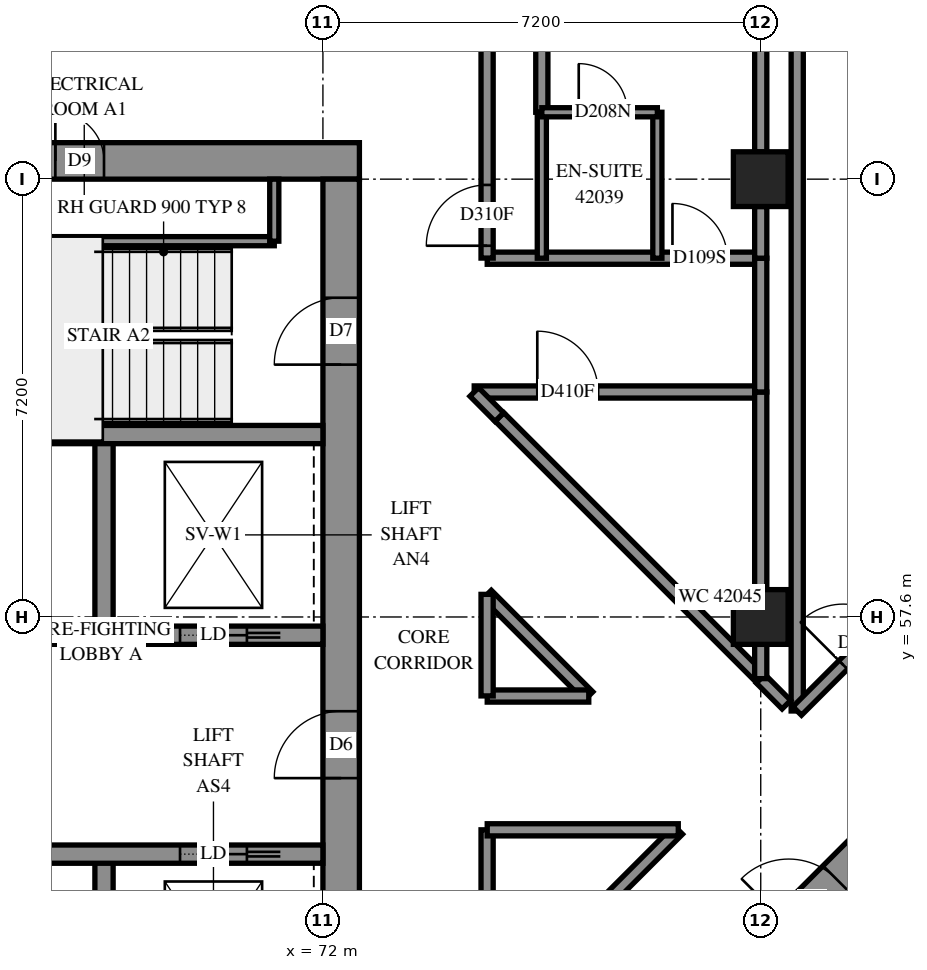
"""IFC4 building model, lengths in metres.
Left out: names, types, materials, properties, quantities, classifications, styles, units other than length and angle.
Written with IfcOpenShell. Run it as: python <this file> out.ifc"""

import sys

from ifc_helpers import new_model, si_unit, direction, frame, frame_2d, origin, origin_2d, place, context, subcontext, project, spatial, rectangle, extrude, element, fill, save


model = new_model("IFC4")
c1 = context("Model", 3, precision=1e-05, world=origin(), true_north=direction((0.0, 1.0)))
c2 = subcontext(c1, "Body", "Model", "MODEL_VIEW")
j1 = project(units=[si_unit("LENGTHUNIT", "METRE"), si_unit("PLANEANGLEUNIT", "RADIAN")], contexts=[c1])
p1 = place(None, origin())
s1 = spatial("IfcSite", under=j1, at=p1, CompositionType="ELEMENT")
p2 = place(p1, origin())
s2 = spatial("IfcBuilding", under=s1, at=p2, CompositionType="ELEMENT")
p3 = place(p2, frame((0.0, 0.0, 155.8)))
s3 = spatial("IfcBuildingStorey", under=s2, at=p3, CompositionType="ELEMENT", Elevation=155.8)
for number, where, z_axis, x_axis in (
    (1, (79.2, 57.6, 0.0), (0.0, 0.0, 1.0), (1.0, 0.0, 0.0)),
    (2, (79.2, 64.8, 0.0), (0.0, 0.0, 1.0), (1.0, 0.0, 0.0)),
):
    element("IfcColumn", number, at=place(p3, frame(where, z_axis=z_axis, x_axis=x_axis)), inside=s3, PredefinedType="COLUMN", context=c2, shape_type="SweptSolid", body=[
        extrude(rectangle(XDim=0.9, YDim=0.9, at=origin_2d()), origin(), (0.0, 0.0, 1.0), 3.1),
    ])
p4 = place(p3, frame((57.0, 65.1, -0.3), z_axis=(0.0, 0.0, 1.0), x_axis=(1.0, 0.0, 0.0)))
e3 = element("IfcWall", 3, at=p4, inside=s3, PredefinedType="SHEAR", context=c2, shape_type="SweptSolid", body=[
    extrude(rectangle(XDim=15.6, YDim=0.6, at=frame_2d((7.8, 0.0))), origin(), (0.0, 0.0, 1.0), 2.7),
])
p5 = place(p4, frame((10.6, 0.0, 0.3)))
e4 = element("IfcOpeningElement", 4, at=p5, cuts=e3, PredefinedType="OPENING", context=c2, shape_type="SweptSolid", body=[
    extrude(rectangle(XDim=0.8, YDim=2.1, at=frame_2d((0.4, 1.05))), frame((0.0, 0.31, 0.0), z_axis=(0.0, -1.0, 0.0), x_axis=(1.0, 0.0, 0.0)), (0.0, 0.0, 1.0), 0.62),
])
p6 = place(p3, frame((72.3, 50.4, -0.3), z_axis=(0.0, 0.0, 1.0), x_axis=(0.0, 1.0, 0.0)))
e5 = element("IfcWall", 5, at=p6, inside=s3, PredefinedType="SHEAR", context=c2, shape_type="SweptSolid", body=[
    extrude(rectangle(XDim=14.4, YDim=0.6, at=frame_2d((7.2, 0.0))), origin(), (0.0, 0.0, 1.0), 2.7),
])
p7 = place(p6, frame((4.55, 0.0, 0.3)))
e6 = element("IfcOpeningElement", 6, at=p7, cuts=e5, PredefinedType="OPENING", context=c2, shape_type="SweptSolid", body=[
    extrude(rectangle(XDim=1.1, YDim=2.1, at=frame_2d((0.55, 1.05))), frame((0.0, 0.31, 0.0), z_axis=(0.0, -1.0, 0.0), x_axis=(1.0, 0.0, 0.0)), (0.0, 0.0, 1.0), 0.62),
])
p8 = place(p6, frame((11.35, 0.0, 0.3)))
e7 = element("IfcOpeningElement", 7, at=p8, cuts=e5, PredefinedType="OPENING", context=c2, shape_type="SweptSolid", body=[
    extrude(rectangle(XDim=1.1, YDim=2.1, at=frame_2d((0.55, 1.05))), frame((0.0, 0.31, 0.0), z_axis=(0.0, -1.0, 0.0), x_axis=(1.0, 0.0, 0.0)), (0.0, 0.0, 1.0), 0.62),
])
for number, where, z_axis, x_axis in (
    (8, (68.4, 50.4, 0.0), (0.0, 0.0, 1.0), (0.0, 1.0, 0.0)),
    (9, (68.4, 57.3, 0.0), (0.0, 0.0, 1.0), (0.0, 1.0, 0.0)),
):
    element("IfcWall", number, at=place(p3, frame(where, z_axis=z_axis, x_axis=x_axis)), inside=s3, PredefinedType="SOLIDWALL", context=c2, shape_type="SweptSolid", body=[
        extrude(rectangle(XDim=3.3, YDim=0.3, at=frame_2d((1.65, 0.0))), origin(), (0.0, 0.0, 1.0), 3.1),
    ])
p9 = place(p3, frame((57.6, 53.7, 0.0), z_axis=(0.0, 0.0, 1.0), x_axis=(1.0, 0.0, 0.0)))
e10 = element("IfcWall", 10, at=p9, inside=s3, PredefinedType="SOLIDWALL", context=c2, shape_type="SweptSolid", body=[
    extrude(rectangle(XDim=14.4, YDim=0.3, at=frame_2d((7.2, 0.0))), origin(), (0.0, 0.0, 1.0), 3.1),
])
p10 = place(p9, frame((1.35, 0.0, 0.0)))
e11 = element("IfcOpeningElement", 11, at=p10, cuts=e10, PredefinedType="OPENING", context=c2, shape_type="SweptSolid", body=[
    extrude(rectangle(XDim=0.9, YDim=2.1, at=frame_2d((0.45, 1.05))), frame((0.0, 0.16, 0.0), z_axis=(0.0, -1.0, 0.0), x_axis=(1.0, 0.0, 0.0)), (0.0, 0.0, 1.0), 0.32),
])
p11 = place(p9, frame((4.95, 0.0, 0.0)))
e12 = element("IfcOpeningElement", 12, at=p11, cuts=e10, PredefinedType="OPENING", context=c2, shape_type="SweptSolid", body=[
    extrude(rectangle(XDim=0.9, YDim=2.1, at=frame_2d((0.45, 1.05))), frame((0.0, 0.16, 0.0), z_axis=(0.0, -1.0, 0.0), x_axis=(1.0, 0.0, 0.0)), (0.0, 0.0, 1.0), 0.32),
])
p12 = place(p9, frame((8.55, 0.0, 0.0)))
e13 = element("IfcOpeningElement", 13, at=p12, cuts=e10, PredefinedType="OPENING", context=c2, shape_type="SweptSolid", body=[
    extrude(rectangle(XDim=0.9, YDim=2.1, at=frame_2d((0.45, 1.05))), frame((0.0, 0.16, 0.0), z_axis=(0.0, -1.0, 0.0), x_axis=(1.0, 0.0, 0.0)), (0.0, 0.0, 1.0), 0.32),
])
p13 = place(p9, frame((12.05, 0.0, 0.0)))
e14 = element("IfcOpeningElement", 14, at=p13, cuts=e10, PredefinedType="OPENING", context=c2, shape_type="SweptSolid", body=[
    extrude(rectangle(XDim=1.1, YDim=2.1, at=frame_2d((0.55, 1.05))), frame((0.0, 0.16, 0.0), z_axis=(0.0, -1.0, 0.0), x_axis=(1.0, 0.0, 0.0)), (0.0, 0.0, 1.0), 0.32),
])
p14 = place(p3, frame((57.6, 57.3, 0.0), z_axis=(0.0, 0.0, 1.0), x_axis=(1.0, 0.0, 0.0)))
e15 = element("IfcWall", 15, at=p14, inside=s3, PredefinedType="SOLIDWALL", context=c2, shape_type="SweptSolid", body=[
    extrude(rectangle(XDim=14.4, YDim=0.3, at=frame_2d((7.2, 0.0))), origin(), (0.0, 0.0, 1.0), 3.1),
])
p15 = place(p14, frame((1.25, 0.0, 0.0)))
e16 = element("IfcOpeningElement", 16, at=p15, cuts=e15, PredefinedType="OPENING", context=c2, shape_type="SweptSolid", body=[
    extrude(rectangle(XDim=1.1, YDim=2.1, at=frame_2d((0.55, 1.05))), frame((0.0, 0.16, 0.0), z_axis=(0.0, -1.0, 0.0), x_axis=(1.0, 0.0, 0.0)), (0.0, 0.0, 1.0), 0.32),
])
p16 = place(p14, frame((4.85, 0.0, 0.0)))
e17 = element("IfcOpeningElement", 17, at=p16, cuts=e15, PredefinedType="OPENING", context=c2, shape_type="SweptSolid", body=[
    extrude(rectangle(XDim=1.1, YDim=2.1, at=frame_2d((0.55, 1.05))), frame((0.0, 0.16, 0.0), z_axis=(0.0, -1.0, 0.0), x_axis=(1.0, 0.0, 0.0)), (0.0, 0.0, 1.0), 0.32),
])
p17 = place(p14, frame((8.45, 0.0, 0.0)))
e18 = element("IfcOpeningElement", 18, at=p17, cuts=e15, PredefinedType="OPENING", context=c2, shape_type="SweptSolid", body=[
    extrude(rectangle(XDim=1.1, YDim=2.1, at=frame_2d((0.55, 1.05))), frame((0.0, 0.16, 0.0), z_axis=(0.0, -1.0, 0.0), x_axis=(1.0, 0.0, 0.0)), (0.0, 0.0, 1.0), 0.32),
])
p18 = place(p14, frame((12.05, 0.0, 0.0)))
e19 = element("IfcOpeningElement", 19, at=p18, cuts=e15, PredefinedType="OPENING", context=c2, shape_type="SweptSolid", body=[
    extrude(rectangle(XDim=1.1, YDim=2.1, at=frame_2d((0.55, 1.05))), frame((0.0, 0.16, 0.0), z_axis=(0.0, -1.0, 0.0), x_axis=(1.0, 0.0, 0.0)), (0.0, 0.0, 1.0), 0.32),
])
p19 = place(p3, frame((64.8, 60.6, 0.0), z_axis=(0.0, 0.0, 1.0), x_axis=(1.0, 0.0, 0.0)))
e20 = element("IfcWall", 20, at=p19, inside=s3, PredefinedType="SOLIDWALL", context=c2, shape_type="SweptSolid", body=[
    extrude(rectangle(XDim=7.2, YDim=0.3, at=frame_2d((3.6, 0.0))), origin(), (0.0, 0.0, 1.0), 3.1),
])
p20 = place(p3, frame((76.442, 49.302, -0.3), z_axis=(0.0, 0.0, 1.0), x_axis=(0.7071067812, 0.7071067812, 0.0)))
e21 = element("IfcWall", 21, at=p20, inside=s3, PredefinedType="SHEAR", context=c2, shape_type="SweptSolid", body=[
    extrude(rectangle(XDim=14.4, YDim=0.6, at=frame_2d((7.2, 0.0))), origin(), (0.0, 0.0, 1.0), 2.7),
])
p21 = place(p20, frame((4.55, 0.0, 0.3)))
e22 = element("IfcOpeningElement", 22, at=p21, cuts=e21, PredefinedType="OPENING", context=c2, shape_type="SweptSolid", body=[
    extrude(rectangle(XDim=1.1, YDim=2.1, at=frame_2d((0.55, 1.05))), frame((0.0, 0.31, 0.0), z_axis=(0.0, -1.0, 0.0), x_axis=(1.0, 0.0, 0.0)), (0.0, 0.0, 1.0), 0.62),
])
p22 = place(p20, frame((11.35, 0.0, 0.3)))
e23 = element("IfcOpeningElement", 23, at=p22, cuts=e21, PredefinedType="OPENING", context=c2, shape_type="SweptSolid", body=[
    extrude(rectangle(XDim=1.1, YDim=2.1, at=frame_2d((0.55, 1.05))), frame((0.0, 0.31, 0.0), z_axis=(0.0, -1.0, 0.0), x_axis=(1.0, 0.0, 0.0)), (0.0, 0.0, 1.0), 0.62),
])
p23 = place(p3, frame((64.95, 63.78, 0.0), z_axis=(0.0, 0.0, 1.0), x_axis=(1.0, 0.0, 0.0)))
e24 = element("IfcWall", 24, at=p23, inside=s3, PredefinedType="PARTITIONING", context=c2, shape_type="SweptSolid", body=[
    extrude(rectangle(XDim=6.25, YDim=0.15, at=frame_2d((3.125, 0.0))), origin(), (0.0, 0.0, 1.0), 3.1),
])
p24 = place(p3, frame((71.2, 63.78, 0.0), z_axis=(0.0, 0.0, 1.0), x_axis=(0.0, 1.0, 0.0)))
e25 = element("IfcWall", 25, at=p24, inside=s3, PredefinedType="PARTITIONING", context=c2, shape_type="SweptSolid", body=[
    extrude(rectangle(XDim=1.02, YDim=0.15, at=frame_2d((0.51, 0.0))), origin(), (0.0, 0.0, 1.0), 3.1),
])
p25 = place(p3, frame((79.8, 56.054, 0.0), z_axis=(0.0, 0.0, 1.0), x_axis=(0.0, 1.0, 0.0)))
e26 = element("IfcWall", 26, at=p25, inside=s3, PredefinedType="PARTITIONING", context=c2, shape_type="SweptSolid", body=[
    extrude(rectangle(XDim=11.454, YDim=0.2, at=frame_2d((5.727, 0.0))), origin(), (0.0, 0.0, 1.0), 3.1),
])
p26 = place(p3, frame((79.799, 56.055, 0.0), z_axis=(0.0, 0.0, 1.0), x_axis=(0.7071067812, 0.7071067812, 0.0)))
e27 = element("IfcWall", 27, at=p26, inside=s3, PredefinedType="PARTITIONING", context=c2, shape_type="SweptSolid", body=[
    extrude(rectangle(XDim=9.95, YDim=0.2, at=frame_2d((4.975, 0.0))), origin(), (0.0, 0.0, 1.0), 3.1),
])
p27 = place(p26, frame((1.071, 0.0, 0.0)))
e28 = element("IfcOpeningElement", 28, at=p27, cuts=e27, PredefinedType="OPENING", context=c2, shape_type="SweptSolid", body=[
    extrude(rectangle(XDim=1.0, YDim=2.1, at=frame_2d((0.5, 1.05))), frame((0.0, 0.11, 0.0), z_axis=(0.0, -1.0, 0.0), x_axis=(1.0, 0.0, 0.0)), (0.0, 0.0, 1.0), 0.22),
])
p28 = place(p3, frame((75.6, 65.9, 0.0), z_axis=(0.0, 0.0, 1.0), x_axis=(0.0, 1.0, 0.0)))
e29 = element("IfcWall", 29, at=p28, inside=s3, PredefinedType="PARTITIONING", context=c2, shape_type="SweptSolid", body=[
    extrude(rectangle(XDim=6.89, YDim=0.2, at=frame_2d((3.445, 0.0))), origin(), (0.0, 0.0, 1.0), 3.1),
])
p29 = place(p3, frame((79.2, 65.25, 0.0), z_axis=(0.0, 0.0, 1.0), x_axis=(0.0, 1.0, 0.0)))
e30 = element("IfcWall", 30, at=p29, inside=s3, PredefinedType="PARTITIONING", context=c2, shape_type="SweptSolid", body=[
    extrude(rectangle(XDim=6.3, YDim=0.2, at=frame_2d((3.15, 0.0))), origin(), (0.0, 0.0, 1.0), 3.1),
])
p30 = place(p3, frame((74.903, 60.889, 0.0), z_axis=(0.0, 0.0, 1.0), x_axis=(0.7071067812, -0.7071067812, 0.0)))
e31 = element("IfcWall", 31, at=p30, inside=s3, PredefinedType="PARTITIONING", context=c2, shape_type="SweptSolid", body=[
    extrude(rectangle(XDim=6.081, YDim=0.2, at=frame_2d((3.041, 0.0))), origin(), (0.0, 0.0, 1.0), 3.1),
])
p31 = place(p3, frame((74.488, 61.3, 0.0), z_axis=(0.0, 0.0, 1.0), x_axis=(1.0, 0.0, 0.0)))
e32 = element("IfcWall", 32, at=p31, inside=s3, PredefinedType="PARTITIONING", context=c2, shape_type="SweptSolid", body=[
    extrude(rectangle(XDim=4.712, YDim=0.2, at=frame_2d((2.356, 0.0))), origin(), (0.0, 0.0, 1.0), 3.1),
])
p32 = place(p31, frame((1.037, 0.0, 0.0)))
e33 = element("IfcOpeningElement", 33, at=p32, cuts=e32, PredefinedType="OPENING", context=c2, shape_type="SweptSolid", body=[
    extrude(rectangle(XDim=1.0, YDim=2.1, at=frame_2d((0.5, 1.05))), frame((0.0, 0.11, 0.0), z_axis=(0.0, -1.0, 0.0), x_axis=(1.0, 0.0, 0.0)), (0.0, 0.0, 1.0), 0.22),
])
p33 = place(p3, frame((74.702, 63.5, 0.0), z_axis=(0.0, 0.0, 1.0), x_axis=(1.0, 0.0, 0.0)))
e34 = element("IfcWall", 34, at=p33, inside=s3, PredefinedType="PARTITIONING", context=c2, shape_type="SweptSolid", body=[
    extrude(rectangle(XDim=4.498, YDim=0.2, at=frame_2d((2.249, 0.0))), origin(), (0.0, 0.0, 1.0), 3.1),
])
p34 = place(p33, frame((3.046, 0.0, 0.0)))
e35 = element("IfcOpeningElement", 35, at=p34, cuts=e34, PredefinedType="OPENING", context=c2, shape_type="SweptSolid", body=[
    extrude(rectangle(XDim=0.9, YDim=2.1, at=frame_2d((0.45, 1.05))), frame((0.0, 0.11, 0.0), z_axis=(0.0, -1.0, 0.0), x_axis=(1.0, 0.0, 0.0)), (0.0, 0.0, 1.0), 0.22),
])
p35 = place(p3, frame((74.701, 50.957, 0.0), z_axis=(0.0, 0.0, 1.0), x_axis=(0.7071067812, 0.7071067812, 0.0)))
e36 = element("IfcWall", 36, at=p35, inside=s3, PredefinedType="PARTITIONING", context=c2, shape_type="SweptSolid", body=[
    extrude(rectangle(XDim=4.444, YDim=0.2, at=frame_2d((2.222, 0.0))), origin(), (0.0, 0.0, 1.0), 3.1),
])
p36 = place(p3, frame((74.7, 63.502, 0.0), z_axis=(0.0, 0.0, 1.0), x_axis=(0.0, 1.0, 0.0)))
e37 = element("IfcWall", 37, at=p36, inside=s3, PredefinedType="PARTITIONING", context=c2, shape_type="SweptSolid", body=[
    extrude(rectangle(XDim=3.998, YDim=0.2, at=frame_2d((1.999, 0.0))), origin(), (0.0, 0.0, 1.0), 3.1),
])
p37 = place(p36, frame((0.203, 0.0, 0.0)))
e38 = element("IfcOpeningElement", 38, at=p37, cuts=e37, PredefinedType="OPENING", context=c2, shape_type="SweptSolid", body=[
    extrude(rectangle(XDim=1.0, YDim=2.1, at=frame_2d((0.5, 1.05))), frame((0.0, 0.11, 0.0), z_axis=(0.0, -1.0, 0.0), x_axis=(1.0, 0.0, 0.0)), (0.0, 0.0, 1.0), 0.22),
])
p38 = place(p3, frame((79.2, 58.05, 0.0), z_axis=(0.0, 0.0, 1.0), x_axis=(0.0, 1.0, 0.0)))
e39 = element("IfcWall", 39, at=p38, inside=s3, PredefinedType="PARTITIONING", context=c2, shape_type="SweptSolid", body=[
    extrude(rectangle(XDim=3.25, YDim=0.2, at=frame_2d((1.625, 0.0))), origin(), (0.0, 0.0, 1.0), 3.1),
])
p39 = place(p3, frame((74.7, 50.956, 0.0), z_axis=(0.0, 0.0, 1.0), x_axis=(0.0, 1.0, 0.0)))
e40 = element("IfcWall", 40, at=p39, inside=s3, PredefinedType="PARTITIONING", context=c2, shape_type="SweptSolid", body=[
    extrude(rectangle(XDim=3.144, YDim=0.2, at=frame_2d((1.572, 0.0))), origin(), (0.0, 0.0, 1.0), 3.1),
])
p40 = place(p3, frame((74.702, 54.1, 0.0), z_axis=(0.0, 0.0, 1.0), x_axis=(1.0, 0.0, 0.0)))
e41 = element("IfcWall", 41, at=p40, inside=s3, PredefinedType="PARTITIONING", context=c2, shape_type="SweptSolid", body=[
    extrude(rectangle(XDim=3.142, YDim=0.2, at=frame_2d((1.571, 0.0))), origin(), (0.0, 0.0, 1.0), 3.1),
])
for number, where, z_axis, x_axis in (
    (42, (75.6, 63.5, 0.0), (0.0, 0.0, 1.0), (0.0, 1.0, 0.0)),
    (43, (77.5, 63.5, 0.0), (0.0, 0.0, 1.0), (0.0, 1.0, 0.0)),
):
    element("IfcWall", number, at=place(p3, frame(where, z_axis=z_axis, x_axis=x_axis)), inside=s3, PredefinedType="PARTITIONING", context=c2, shape_type="SweptSolid", body=[
        extrude(rectangle(XDim=2.4, YDim=0.15, at=frame_2d((1.2, 0.0))), origin(), (0.0, 0.0, 1.0), 3.1),
    ])
p41 = place(p3, frame((74.699, 57.969, 0.0), z_axis=(0.0, 0.0, 1.0), x_axis=(0.7071067812, -0.7071067812, 0.0)))
e44 = element("IfcWall", 44, at=p41, inside=s3, PredefinedType="PARTITIONING", context=c2, shape_type="SweptSolid", body=[
    extrude(rectangle(XDim=2.362, YDim=0.2, at=frame_2d((1.181, 0.0))), origin(), (0.0, 0.0, 1.0), 3.1),
])
p42 = place(p3, frame((79.2, 61.3, 0.0), z_axis=(0.0, 0.0, 1.0), x_axis=(0.0, 1.0, 0.0)))
e45 = element("IfcWall", 45, at=p42, inside=s3, PredefinedType="PARTITIONING", context=c2, shape_type="SweptSolid", body=[
    extrude(rectangle(XDim=2.2, YDim=0.2, at=frame_2d((1.1, 0.0))), origin(), (0.0, 0.0, 1.0), 3.1),
])
p43 = place(p3, frame((75.6, 65.9, 0.0), z_axis=(0.0, 0.0, 1.0), x_axis=(1.0, 0.0, 0.0)))
e46 = element("IfcWall", 46, at=p43, inside=s3, PredefinedType="PARTITIONING", context=c2, shape_type="SweptSolid", body=[
    extrude(rectangle(XDim=1.9, YDim=0.15, at=frame_2d((0.95, 0.0))), origin(), (0.0, 0.0, 1.0), 3.1),
])
p44 = place(p43, frame((0.607, 0.0, 0.0)))
e47 = element("IfcOpeningElement", 47, at=p44, cuts=e46, PredefinedType="OPENING", context=c2, shape_type="SweptSolid", body=[
    extrude(rectangle(XDim=0.8, YDim=2.1, at=frame_2d((0.4, 1.05))), frame((0.0, 0.085, 0.0), z_axis=(0.0, -1.0, 0.0), x_axis=(1.0, 0.0, 0.0)), (0.0, 0.0, 1.0), 0.17),
])
for number, where, z_axis, x_axis in (
    (48, (74.702, 56.3, 0.0), (0.0, 0.0, 1.0), (1.0, 0.0, 0.0)),
    (49, (74.7, 56.302, 0.0), (0.0, 0.0, 1.0), (0.0, 1.0, 0.0)),
):
    element("IfcWall", number, at=place(p3, frame(where, z_axis=z_axis, x_axis=x_axis)), inside=s3, PredefinedType="PARTITIONING", context=c2, shape_type="SweptSolid", body=[
        extrude(rectangle(XDim=1.67, YDim=0.2, at=frame_2d((0.835, 0.0))), origin(), (0.0, 0.0, 1.0), 3.1),
    ])
p45 = place(p3, frame((79.2, 63.5, 0.0), z_axis=(0.0, 0.0, 1.0), x_axis=(0.0, 1.0, 0.0)))
e50 = element("IfcWall", 50, at=p45, inside=s3, PredefinedType="PARTITIONING", context=c2, shape_type="SweptSolid", body=[
    extrude(rectangle(XDim=0.85, YDim=0.2, at=frame_2d((0.425, 0.0))), origin(), (0.0, 0.0, 1.0), 3.1),
])
p46 = place(p3, frame((79.198, 56.584, 0.0), z_axis=(0.0, 0.0, 1.0), x_axis=(0.7054410477, -0.7087685999, 0.0)))
e51 = element("IfcWall", 51, at=p46, inside=s3, PredefinedType="PARTITIONING", context=c2, shape_type="SweptSolid", body=[
    extrude(rectangle(XDim=0.601, YDim=0.2, at=frame_2d((0.3, 0.0))), origin(), (0.0, 0.0, 1.0), 3.1),
])
p47 = place(p3, frame((74.489, 61.301, 0.0), z_axis=(0.0, 0.0, 1.0), x_axis=(0.7053925905, -0.7088168263, 0.0)))
e52 = element("IfcWall", 52, at=p47, inside=s3, PredefinedType="PARTITIONING", context=c2, shape_type="SweptSolid", body=[
    extrude(rectangle(XDim=0.584, YDim=0.2, at=frame_2d((0.292, 0.0))), origin(), (0.0, 0.0, 1.0), 3.1),
])
p48 = place(p3, frame((79.2, 56.586, 0.0), z_axis=(0.0, 0.0, 1.0), x_axis=(0.0, 1.0, 0.0)))
e53 = element("IfcWall", 53, at=p48, inside=s3, PredefinedType="PARTITIONING", context=c2, shape_type="SweptSolid", body=[
    extrude(rectangle(XDim=0.564, YDim=0.2, at=frame_2d((0.282, 0.0))), origin(), (0.0, 0.0, 1.0), 3.1),
])
p49 = place(p5, origin())
e54 = element("IfcDoor", 54, at=p49, inside=s3, OperationType="SINGLE_SWING_RIGHT", PredefinedType="DOOR", context=c2, shape_type="SweptSolid", body=[
    extrude(rectangle(XDim=0.8, YDim=2.1, at=frame_2d((0.4, 1.05))), frame((0.0, 0.025, 0.0), z_axis=(0.0, -1.0, 0.0), x_axis=(1.0, 0.0, 0.0)), (0.0, 0.0, 1.0), 0.05),
])
fill(e4, e54)
p50 = place(p7, origin())
e55 = element("IfcDoor", 55, at=p50, inside=s3, OperationType="DOUBLE_DOOR_SINGLE_SWING", PredefinedType="DOOR", context=c2, shape_type="SweptSolid", body=[
    extrude(rectangle(XDim=1.1, YDim=2.1, at=frame_2d((0.55, 1.05))), frame((0.0, 0.025, 0.0), z_axis=(0.0, -1.0, 0.0), x_axis=(1.0, 0.0, 0.0)), (0.0, 0.0, 1.0), 0.05),
])
fill(e6, e55)
p51 = place(p8, origin())
e56 = element("IfcDoor", 56, at=p51, inside=s3, OperationType="SINGLE_SWING_RIGHT", PredefinedType="DOOR", context=c2, shape_type="SweptSolid", body=[
    extrude(rectangle(XDim=1.1, YDim=2.1, at=frame_2d((0.55, 1.05))), frame((0.0, 0.025, 0.0), z_axis=(0.0, -1.0, 0.0), x_axis=(1.0, 0.0, 0.0)), (0.0, 0.0, 1.0), 0.05),
])
fill(e7, e56)
p52 = place(p13, origin())
e57 = element("IfcDoor", 57, at=p52, inside=s3, OperationType="SLIDING_TO_RIGHT", PredefinedType="DOOR", context=c2, shape_type="SweptSolid", body=[
    extrude(rectangle(XDim=1.1, YDim=2.1, at=frame_2d((0.55, 1.05))), frame((0.0, 0.025, 0.0), z_axis=(0.0, -1.0, 0.0), x_axis=(1.0, 0.0, 0.0)), (0.0, 0.0, 1.0), 0.05),
])
fill(e14, e57)
p53 = place(p18, origin())
e58 = element("IfcDoor", 58, at=p53, inside=s3, OperationType="SLIDING_TO_RIGHT", PredefinedType="DOOR", context=c2, shape_type="SweptSolid", body=[
    extrude(rectangle(XDim=1.1, YDim=2.1, at=frame_2d((0.55, 1.05))), frame((0.0, 0.025, 0.0), z_axis=(0.0, -1.0, 0.0), x_axis=(1.0, 0.0, 0.0)), (0.0, 0.0, 1.0), 0.05),
])
fill(e19, e58)
p54 = place(p21, origin())
e59 = element("IfcDoor", 59, at=p54, inside=s3, OperationType="DOUBLE_DOOR_SINGLE_SWING", PredefinedType="DOOR", context=c2, shape_type="SweptSolid", body=[
    extrude(rectangle(XDim=1.1, YDim=2.1, at=frame_2d((0.55, 1.05))), frame((0.0, 0.025, 0.0), z_axis=(0.0, -1.0, 0.0), x_axis=(1.0, 0.0, 0.0)), (0.0, 0.0, 1.0), 0.05),
])
fill(e22, e59)
p55 = place(p37, origin())
e60 = element("IfcDoor", 60, at=p55, inside=s3, OperationType="SINGLE_SWING_RIGHT", PredefinedType="DOOR", context=c2, shape_type="SweptSolid", body=[
    extrude(rectangle(XDim=1.0, YDim=2.1, at=frame_2d((0.5, 1.05))), frame((0.0, 0.025, 0.0), z_axis=(0.0, -1.0, 0.0), x_axis=(1.0, 0.0, 0.0)), (0.0, 0.0, 1.0), 0.05),
])
fill(e38, e60)
p56 = place(p34, origin())
e61 = element("IfcDoor", 61, at=p56, inside=s3, OperationType="SINGLE_SWING_LEFT", PredefinedType="DOOR", context=c2, shape_type="SweptSolid", body=[
    extrude(rectangle(XDim=0.9, YDim=2.1, at=frame_2d((0.45, 1.05))), frame((0.0, 0.025, 0.0), z_axis=(0.0, -1.0, 0.0), x_axis=(1.0, 0.0, 0.0)), (0.0, 0.0, 1.0), 0.05),
])
fill(e35, e61)
p57 = place(p44, origin())
e62 = element("IfcDoor", 62, at=p57, inside=s3, OperationType="SINGLE_SWING_RIGHT", PredefinedType="DOOR", context=c2, shape_type="SweptSolid", body=[
    extrude(rectangle(XDim=0.8, YDim=2.1, at=frame_2d((0.4, 1.05))), frame((0.0, 0.025, 0.0), z_axis=(0.0, -1.0, 0.0), x_axis=(1.0, 0.0, 0.0)), (0.0, 0.0, 1.0), 0.05),
])
fill(e47, e62)
p58 = place(p32, origin())
e63 = element("IfcDoor", 63, at=p58, inside=s3, OperationType="SINGLE_SWING_RIGHT", PredefinedType="DOOR", context=c2, shape_type="SweptSolid", body=[
    extrude(rectangle(XDim=1.0, YDim=2.1, at=frame_2d((0.5, 1.05))), frame((0.0, 0.025, 0.0), z_axis=(0.0, -1.0, 0.0), x_axis=(1.0, 0.0, 0.0)), (0.0, 0.0, 1.0), 0.05),
])
fill(e33, e63)
p59 = place(p27, origin())
e64 = element("IfcDoor", 64, at=p59, inside=s3, OperationType="SINGLE_SWING_RIGHT", PredefinedType="DOOR", context=c2, shape_type="SweptSolid", body=[
    extrude(rectangle(XDim=1.0, YDim=2.1, at=frame_2d((0.5, 1.05))), frame((0.0, 0.025, 0.0), z_axis=(0.0, -1.0, 0.0), x_axis=(1.0, 0.0, 0.0)), (0.0, 0.0, 1.0), 0.05),
])
fill(e28, e64)
save(model, sys.argv[1])
